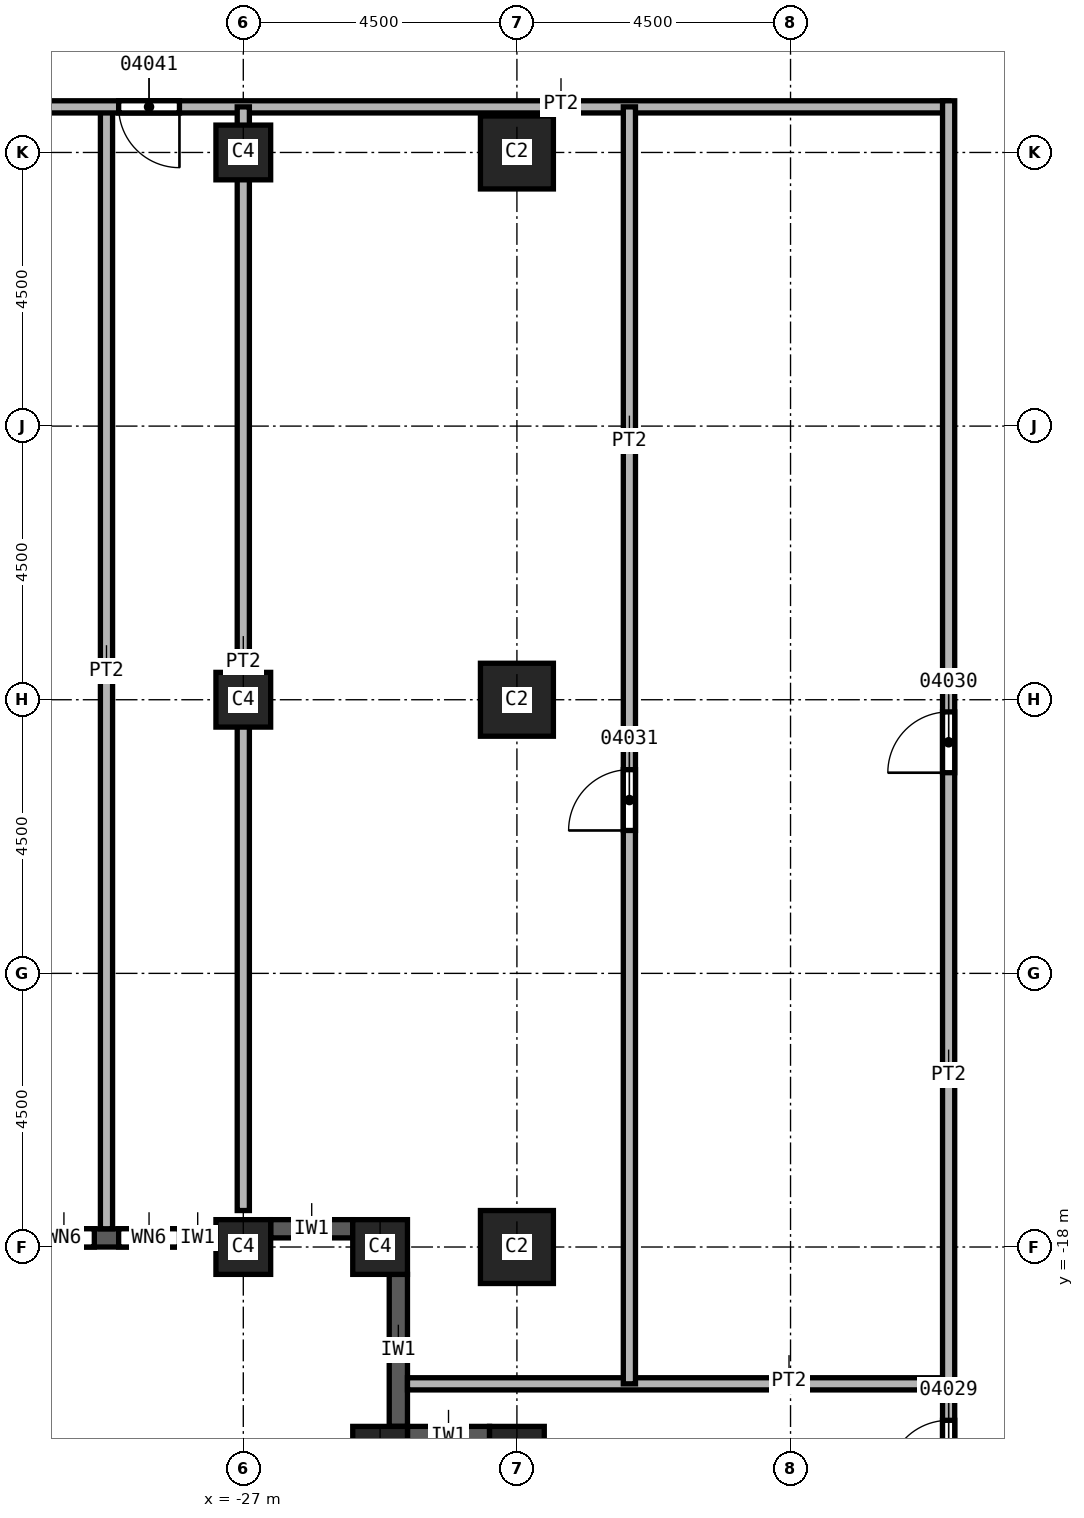
"""IFC4 building model, lengths in metres.
Left out: names, types, materials, properties, quantities, classifications, styles, units other than length and angle.
Written with IfcOpenShell. Run it as: python <this file> out.ifc"""

import sys

from ifc_helpers import new_model, si_unit, direction, frame, frame_2d, origin, origin_2d, place, context, subcontext, project, spatial, rectangle, extrude, element, fill, save


model = new_model("IFC4")
c1 = context("Model", 3, precision=1e-05, world=origin(), true_north=direction((0.0, 1.0)))
c2 = subcontext(c1, "Body", "Model", "MODEL_VIEW")
j1 = project(units=[si_unit("LENGTHUNIT", "METRE"), si_unit("PLANEANGLEUNIT", "RADIAN")], contexts=[c1])
p1 = place(None, origin())
s1 = spatial("IfcSite", under=j1, at=p1, CompositionType="ELEMENT")
p2 = place(p1, origin())
s2 = spatial("IfcBuilding", under=s1, at=p2, CompositionType="ELEMENT")
p3 = place(p2, frame((0.0, 0.0, 108.0)))
s3 = spatial("IfcBuildingStorey", under=s2, at=p3, CompositionType="ELEMENT", Elevation=108.0)
for number, where, z_axis, x_axis in (
    (1, (-22.5, 0.0, 0.0), (0.0, 0.0, 1.0), (1.0, 0.0, 0.0)),
    (2, (-22.5, -9.0, 0.0), (0.0, 0.0, 1.0), (1.0, 0.0, 0.0)),
    (3, (-22.5, -18.0, 0.0), (0.0, 0.0, 1.0), (1.0, 0.0, 0.0)),
):
    element("IfcColumn", number, at=place(p3, frame(where, z_axis=z_axis, x_axis=x_axis)), inside=s3, PredefinedType="COLUMN", context=c2, shape_type="SweptSolid", body=[
        extrude(rectangle(XDim=1.2, YDim=1.2, at=origin_2d()), origin(), (0.0, 0.0, 1.0), 3.7),
    ])
for number, where, z_axis, x_axis in (
    (4, (-27.0, 0.0, 0.0), (0.0, 0.0, 1.0), (1.0, 0.0, 0.0)),
    (5, (-27.0, -9.0, 0.0), (0.0, 0.0, 1.0), (1.0, 0.0, 0.0)),
    (6, (-27.0, -18.0, 0.0), (0.0, 0.0, 1.0), (1.0, 0.0, 0.0)),
    (7, (-22.5, -21.4, 0.0), (0.0, 0.0, 1.0), (1.0, 0.0, 0.0)),
    (8, (-24.75, -21.4, 0.0), (0.0, 0.0, 1.0), (1.0, 0.0, 0.0)),
    (9, (-24.75, -18.0, 0.0), (0.0, 0.0, 1.0), (1.0, 0.0, 0.0)),
):
    element("IfcColumn", number, at=place(p3, frame(where, z_axis=z_axis, x_axis=x_axis)), inside=s3, PredefinedType="COLUMN", context=c2, shape_type="SweptSolid", body=[
        extrude(rectangle(XDim=0.9, YDim=0.9, at=origin_2d()), origin(), (0.0, 0.0, 1.0), 3.7),
    ])
p4 = place(p3, frame((-31.05, -17.85, 0.0), z_axis=(0.0, 0.0, 1.0), x_axis=(1.0, 0.0, 0.0)))
e10 = element("IfcWall", 10, at=p4, inside=s3, PredefinedType="SOLIDWALL", context=c2, shape_type="SweptSolid", body=[
    extrude(rectangle(XDim=3.6, YDim=0.3, at=frame_2d((1.8, 0.0))), origin(), (0.0, 0.0, 1.0), 3.1),
])
p5 = place(p4, frame((0.6, 0.0, 0.8)))
e11 = element("IfcOpeningElement", 11, at=p5, cuts=e10, PredefinedType="OPENING", context=c2, shape_type="SweptSolid", body=[
    extrude(rectangle(XDim=1.0, YDim=1.95, at=frame_2d((0.5, 0.975))), frame((0.0, 0.15, 0.0), z_axis=(0.0, -1.0, 0.0), x_axis=(1.0, 0.0, 0.0)), (0.0, 0.0, 1.0), 0.3),
])
p6 = place(p4, frame((2.0, 0.0, 0.8)))
e12 = element("IfcOpeningElement", 12, at=p6, cuts=e10, PredefinedType="OPENING", context=c2, shape_type="SweptSolid", body=[
    extrude(rectangle(XDim=1.0, YDim=1.95, at=frame_2d((0.5, 0.975))), frame((0.0, 0.15, 0.0), z_axis=(0.0, -1.0, 0.0), x_axis=(1.0, 0.0, 0.0)), (0.0, 0.0, 1.0), 0.3),
])
p7 = place(p3, frame((-26.55, -17.7, 0.0), z_axis=(0.0, 0.0, 1.0), x_axis=(1.0, 0.0, 0.0)))
e13 = element("IfcWall", 13, at=p7, inside=s3, PredefinedType="SOLIDWALL", context=c2, shape_type="SweptSolid", body=[
    extrude(rectangle(XDim=1.35, YDim=0.3, at=frame_2d((0.675, 0.0))), origin(), (0.0, 0.0, 1.0), 3.1),
])
p8 = place(p3, frame((-24.45, -18.45, 0.0), z_axis=(0.0, 0.0, 1.0), x_axis=(0.0, -1.0, 0.0)))
e14 = element("IfcWall", 14, at=p8, inside=s3, PredefinedType="SOLIDWALL", context=c2, shape_type="SweptSolid", body=[
    extrude(rectangle(XDim=2.5, YDim=0.3, at=frame_2d((1.25, 0.0))), origin(), (0.0, 0.0, 1.0), 3.1),
])
p9 = place(p3, frame((-24.3, -21.1, 0.0), z_axis=(0.0, 0.0, 1.0), x_axis=(1.0, 0.0, 0.0)))
e15 = element("IfcWall", 15, at=p9, inside=s3, PredefinedType="SOLIDWALL", context=c2, shape_type="SweptSolid", body=[
    extrude(rectangle(XDim=1.35, YDim=0.3, at=frame_2d((0.675, 0.0))), origin(), (0.0, 0.0, 1.0), 3.1),
])
p10 = place(p3, frame((-29.25, 0.75, 0.0), z_axis=(0.0, 0.0, 1.0), x_axis=(0.0, -1.0, 0.0)))
e16 = element("IfcWall", 16, at=p10, inside=s3, PredefinedType="PARTITIONING", context=c2, shape_type="SweptSolid", body=[
    extrude(rectangle(XDim=18.45, YDim=0.2, at=frame_2d((9.225, 0.0))), origin(), (0.0, 0.0, 1.0), 3.7),
])
p11 = place(p3, frame((-15.4, 0.75, 0.0), z_axis=(0.0, 0.0, 1.0), x_axis=(-1.0, 0.0, 0.0)))
e17 = element("IfcWall", 17, at=p11, inside=s3, PredefinedType="PARTITIONING", context=c2, shape_type="SweptSolid", body=[
    extrude(rectangle(XDim=18.45, YDim=0.2, at=frame_2d((9.225, 0.0))), origin(), (0.0, 0.0, 1.0), 3.7),
])
p12 = place(p11, frame((12.65, 0.0, 0.0)))
e18 = element("IfcOpeningElement", 18, at=p12, cuts=e17, PredefinedType="OPENING", context=c2, shape_type="SweptSolid", body=[
    extrude(rectangle(XDim=1.0, YDim=2.1, at=frame_2d((0.5, 1.05))), frame((0.0, 0.1, 0.0), z_axis=(0.0, -1.0, 0.0), x_axis=(1.0, 0.0, 0.0)), (0.0, 0.0, 1.0), 0.2),
])
p13 = place(p3, frame((-27.0, -17.4, 0.0), z_axis=(0.0, 0.0, 1.0), x_axis=(0.0, 1.0, 0.0)))
e19 = element("IfcWall", 19, at=p13, inside=s3, PredefinedType="PARTITIONING", context=c2, shape_type="SweptSolid", body=[
    extrude(rectangle(XDim=18.15, YDim=0.2, at=frame_2d((9.075, 0.0))), origin(), (0.0, 0.0, 1.0), 3.7),
])
p14 = place(p3, frame((-24.3, -20.25, 0.0), z_axis=(0.0, 0.0, 1.0), x_axis=(1.0, 0.0, 0.0)))
e20 = element("IfcWall", 20, at=p14, inside=s3, PredefinedType="PARTITIONING", context=c2, shape_type="SweptSolid", body=[
    extrude(rectangle(XDim=8.9, YDim=0.2, at=frame_2d((4.45, 0.0))), origin(), (0.0, 0.0, 1.0), 3.7),
])
p15 = place(p3, frame((-20.65, -20.25, 0.0), z_axis=(0.0, 0.0, 1.0), x_axis=(0.0, 1.0, 0.0)))
e21 = element("IfcWall", 21, at=p15, inside=s3, PredefinedType="PARTITIONING", context=c2, shape_type="SweptSolid", body=[
    extrude(rectangle(XDim=21.0, YDim=0.2, at=frame_2d((10.5, 0.0))), origin(), (0.0, 0.0, 1.0), 3.7),
])
p16 = place(p15, frame((9.1, 0.0, 0.0)))
e22 = element("IfcOpeningElement", 22, at=p16, cuts=e21, PredefinedType="OPENING", context=c2, shape_type="SweptSolid", body=[
    extrude(rectangle(XDim=1.0, YDim=2.1, at=frame_2d((0.5, 1.05))), frame((0.0, 0.1, 0.0), z_axis=(0.0, -1.0, 0.0), x_axis=(1.0, 0.0, 0.0)), (0.0, 0.0, 1.0), 0.2),
])
p17 = place(p3, frame((-15.4, -24.5, 0.0), z_axis=(0.0, 0.0, 1.0), x_axis=(0.0, 1.0, 0.0)))
e23 = element("IfcWall", 23, at=p17, inside=s3, PredefinedType="PARTITIONING", context=c2, shape_type="SweptSolid", body=[
    extrude(rectangle(XDim=25.35, YDim=0.2, at=frame_2d((12.675, 0.0))), origin(), (0.0, 0.0, 1.0), 3.7),
])
p18 = place(p17, frame((2.65, 0.0, 0.0)))
e24 = element("IfcOpeningElement", 24, at=p18, cuts=e23, PredefinedType="OPENING", context=c2, shape_type="SweptSolid", body=[
    extrude(rectangle(XDim=1.0, YDim=2.1, at=frame_2d((0.5, 1.05))), frame((0.0, 0.1, 0.0), z_axis=(0.0, -1.0, 0.0), x_axis=(1.0, 0.0, 0.0)), (0.0, 0.0, 1.0), 0.2),
])
p19 = place(p17, frame((14.3, 0.0, 0.0)))
e25 = element("IfcOpeningElement", 25, at=p19, cuts=e23, PredefinedType="OPENING", context=c2, shape_type="SweptSolid", body=[
    extrude(rectangle(XDim=1.0, YDim=2.1, at=frame_2d((0.5, 1.05))), frame((0.0, 0.1, 0.0), z_axis=(0.0, -1.0, 0.0), x_axis=(1.0, 0.0, 0.0)), (0.0, 0.0, 1.0), 0.2),
])
p20 = place(p18, origin())
e26 = element("IfcDoor", 26, at=p20, inside=s3, OperationType="SINGLE_SWING_RIGHT", PredefinedType="DOOR", context=c2, shape_type="SweptSolid", body=[
    extrude(rectangle(XDim=1.0, YDim=2.1, at=frame_2d((0.5, 1.05))), frame((0.0, 0.025, 0.0), z_axis=(0.0, -1.0, 0.0), x_axis=(1.0, 0.0, 0.0)), (0.0, 0.0, 1.0), 0.05),
])
fill(e24, e26)
p21 = place(p19, origin())
e27 = element("IfcDoor", 27, at=p21, inside=s3, OperationType="SINGLE_SWING_LEFT", PredefinedType="DOOR", context=c2, shape_type="SweptSolid", body=[
    extrude(rectangle(XDim=1.0, YDim=2.1, at=frame_2d((0.5, 1.05))), frame((0.0, 0.025, 0.0), z_axis=(0.0, -1.0, 0.0), x_axis=(1.0, 0.0, 0.0)), (0.0, 0.0, 1.0), 0.05),
])
fill(e25, e27)
p22 = place(p16, origin())
e28 = element("IfcDoor", 28, at=p22, inside=s3, OperationType="SINGLE_SWING_RIGHT", PredefinedType="DOOR", context=c2, shape_type="SweptSolid", body=[
    extrude(rectangle(XDim=1.0, YDim=2.1, at=frame_2d((0.5, 1.05))), frame((0.0, 0.025, 0.0), z_axis=(0.0, -1.0, 0.0), x_axis=(1.0, 0.0, 0.0)), (0.0, 0.0, 1.0), 0.05),
])
fill(e22, e28)
p23 = place(p12, origin())
e29 = element("IfcDoor", 29, at=p23, inside=s3, OperationType="SINGLE_SWING_RIGHT", PredefinedType="DOOR", context=c2, shape_type="SweptSolid", body=[
    extrude(rectangle(XDim=1.0, YDim=2.1, at=frame_2d((0.5, 1.05))), frame((0.0, 0.025, 0.0), z_axis=(0.0, -1.0, 0.0), x_axis=(1.0, 0.0, 0.0)), (0.0, 0.0, 1.0), 0.05),
])
fill(e18, e29)
p24 = place(p5, origin())
e30 = element("IfcWindow", 30, at=p24, inside=s3, PartitioningType="SINGLE_PANEL", PredefinedType="WINDOW", context=c2, shape_type="SweptSolid", body=[
    extrude(rectangle(XDim=1.0, YDim=1.95, at=frame_2d((0.5, 0.975))), frame((0.0, 0.03, 0.0), z_axis=(0.0, -1.0, 0.0), x_axis=(1.0, 0.0, 0.0)), (0.0, 0.0, 1.0), 0.06),
])
fill(e11, e30)
p25 = place(p6, origin())
e31 = element("IfcWindow", 31, at=p25, inside=s3, PartitioningType="SINGLE_PANEL", PredefinedType="WINDOW", context=c2, shape_type="SweptSolid", body=[
    extrude(rectangle(XDim=1.0, YDim=1.95, at=frame_2d((0.5, 0.975))), frame((0.0, 0.03, 0.0), z_axis=(0.0, -1.0, 0.0), x_axis=(1.0, 0.0, 0.0)), (0.0, 0.0, 1.0), 0.06),
])
fill(e12, e31)
save(model, sys.argv[1])
